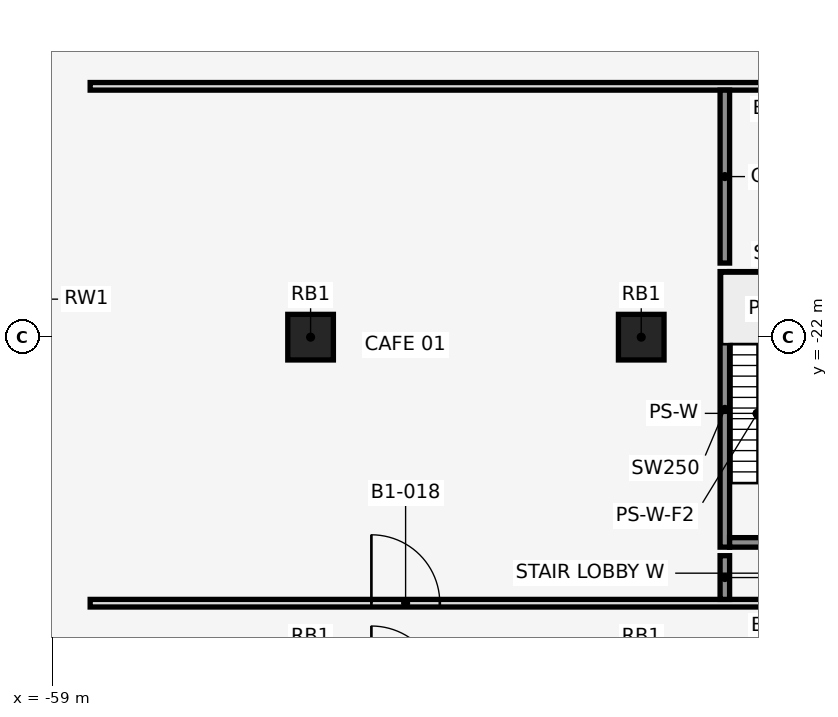
"""IFC4 building model, lengths in metres.
Left out: names, types, materials, properties, quantities, classifications, styles, units other than length and angle.
Written with IfcOpenShell. Run it as: python <this file> out.ifc"""

import sys

from ifc_helpers import new_model, si_unit, direction, frame, frame_2d, origin, origin_2d, place, context, subcontext, project, spatial, rectangle, extrude, element, fill, save


model = new_model("IFC4")
c1 = context("Model", 3, precision=1e-05, world=origin(), true_north=direction((0.0, 1.0)))
c2 = subcontext(c1, "Body", "Model", "MODEL_VIEW")
j1 = project(units=[si_unit("LENGTHUNIT", "METRE"), si_unit("PLANEANGLEUNIT", "RADIAN")], contexts=[c1])
p1 = place(None, origin())
s1 = spatial("IfcSite", under=j1, at=p1, CompositionType="ELEMENT")
p2 = place(p1, origin())
s2 = spatial("IfcBuilding", under=s1, at=p2, CompositionType="ELEMENT")
p3 = place(p2, frame((0.0, 0.0, -5.0)))
s3 = spatial("IfcBuildingStorey", under=s2, at=p3, CompositionType="ELEMENT", Elevation=-5.0)
for number, where, z_axis, x_axis in (
    (1, (-52.2, -22.0, 0.0), (0.0, 0.0, 1.0), (1.0, 0.0, 0.0)),
    (2, (-43.5, -22.0, 0.0), (0.0, 0.0, 1.0), (1.0, 0.0, 0.0)),
):
    element("IfcColumn", number, at=place(p3, frame(where, z_axis=z_axis, x_axis=x_axis)), inside=s3, PredefinedType="COLUMN", context=c2, shape_type="SweptSolid", body=[
        extrude(rectangle(XDim=1.2, YDim=1.2, at=origin_2d()), origin(), (0.0, 0.0, 1.0), 5.0),
    ])
p4 = place(p3, frame((-41.3, -27.525, 0.0), z_axis=(0.0, 0.0, 1.0), x_axis=(0.0, 1.0, 0.0)))
e3 = element("IfcWall", 3, at=p4, inside=s3, PredefinedType="SHEAR", context=c2, shape_type="SweptSolid", body=[
    extrude(rectangle(XDim=7.25, YDim=0.25, at=frame_2d((3.625, 0.0))), origin(), (0.0, 0.0, 1.0), 5.0),
])
p5 = place(p3, frame((-41.175, -27.4, 0.0), z_axis=(0.0, 0.0, 1.0), x_axis=(1.0, 0.0, 0.0)))
e4 = element("IfcWall", 4, at=p5, inside=s3, PredefinedType="SHEAR", context=c2, shape_type="SweptSolid", body=[
    extrude(rectangle(XDim=3.05, YDim=0.25, at=frame_2d((1.525, 0.0))), origin(), (0.0, 0.0, 1.0), 5.0),
])
p6 = place(p5, frame((1.1, 0.0, 0.0)))
e5 = element("IfcOpeningElement", 5, at=p6, cuts=e4, PredefinedType="OPENING", context=c2, shape_type="SweptSolid", body=[
    extrude(rectangle(XDim=0.9, YDim=2.1, at=frame_2d((0.45, 1.05))), frame((0.0, 0.137, 0.0), z_axis=(0.0, -1.0, 0.0), x_axis=(1.0, 0.0, 0.0)), (0.0, 0.0, 1.0), 0.274),
])
p7 = place(p3, frame((-41.175, -20.4, 0.0), z_axis=(0.0, 0.0, 1.0), x_axis=(1.0, 0.0, 0.0)))
e6 = element("IfcWall", 6, at=p7, inside=s3, PredefinedType="SHEAR", context=c2, shape_type="SweptSolid", body=[
    extrude(rectangle(XDim=3.05, YDim=0.25, at=frame_2d((1.525, 0.0))), origin(), (0.0, 0.0, 1.0), 5.0),
])
p8 = place(p3, frame((-58.0, -29.0, 0.0), z_axis=(0.0, 0.0, 1.0), x_axis=(1.0, 0.0, 0.0)))
e7 = element("IfcWall", 7, at=p8, inside=s3, PredefinedType="PARTITIONING", context=c2, shape_type="SweptSolid", body=[
    extrude(rectangle(XDim=38.425, YDim=0.2, at=frame_2d((19.212, 0.0))), origin(), (0.0, 0.0, 1.0), 4.7),
])
p9 = place(p8, frame((17.7, 0.0, 0.0)))
e8 = element("IfcOpeningElement", 8, at=p9, cuts=e7, PredefinedType="OPENING", context=c2, shape_type="SweptSolid", body=[
    extrude(rectangle(XDim=1.2, YDim=2.1, at=frame_2d((0.6, 1.05))), frame((0.0, 0.112, 0.0), z_axis=(0.0, -1.0, 0.0), x_axis=(1.0, 0.0, 0.0)), (0.0, 0.0, 1.0), 0.224),
])
p10 = place(p8, frame((36.0, 0.0, 0.0)))
e9 = element("IfcOpeningElement", 9, at=p10, cuts=e7, PredefinedType="OPENING", context=c2, shape_type="SweptSolid", body=[
    extrude(rectangle(XDim=1.2, YDim=2.1, at=frame_2d((0.6, 1.05))), frame((0.0, 0.112, 0.0), z_axis=(0.0, -1.0, 0.0), x_axis=(1.0, 0.0, 0.0)), (0.0, 0.0, 1.0), 0.224),
])
p11 = place(p8, frame((7.4, 0.0, 0.0)))
e10 = element("IfcOpeningElement", 10, at=p11, cuts=e7, PredefinedType="OPENING", context=c2, shape_type="SweptSolid", body=[
    extrude(rectangle(XDim=1.8, YDim=2.1, at=frame_2d((0.9, 1.05))), frame((0.0, 0.112, 0.0), z_axis=(0.0, -1.0, 0.0), x_axis=(1.0, 0.0, 0.0)), (0.0, 0.0, 1.0), 0.224),
])
p12 = place(p8, frame((27.0, 0.0, 0.0)))
e11 = element("IfcOpeningElement", 11, at=p12, cuts=e7, PredefinedType="OPENING", context=c2, shape_type="SweptSolid", body=[
    extrude(rectangle(XDim=1.0, YDim=2.1, at=frame_2d((0.5, 1.05))), frame((0.0, 0.112, 0.0), z_axis=(0.0, -1.0, 0.0), x_axis=(1.0, 0.0, 0.0)), (0.0, 0.0, 1.0), 0.224),
])
p13 = place(p3, frame((-58.0, -15.4, 0.0), z_axis=(0.0, 0.0, 1.0), x_axis=(1.0, 0.0, 0.0)))
e12 = element("IfcWall", 12, at=p13, inside=s3, PredefinedType="PARTITIONING", context=c2, shape_type="SweptSolid", body=[
    extrude(rectangle(XDim=38.425, YDim=0.2, at=frame_2d((19.212, 0.0))), origin(), (0.0, 0.0, 1.0), 4.7),
])
p14 = place(p13, frame((17.9, 0.0, 0.0)))
e13 = element("IfcOpeningElement", 13, at=p14, cuts=e12, PredefinedType="OPENING", context=c2, shape_type="SweptSolid", body=[
    extrude(rectangle(XDim=0.9, YDim=2.1, at=frame_2d((0.45, 1.05))), frame((0.0, 0.112, 0.0), z_axis=(0.0, -1.0, 0.0), x_axis=(1.0, 0.0, 0.0)), (0.0, 0.0, 1.0), 0.224),
])
p15 = place(p3, frame((-41.3, -28.9, 0.0), z_axis=(0.0, 0.0, 1.0), x_axis=(0.0, 1.0, 0.0)))
e14 = element("IfcWall", 14, at=p15, inside=s3, PredefinedType="SHEAR", context=c2, shape_type="SweptSolid", body=[
    extrude(rectangle(XDim=1.15, YDim=0.25, at=frame_2d((0.575, 0.0))), origin(), (0.0, 0.0, 1.0), 5.0),
])
p16 = place(p3, frame((-41.3, -20.05, 0.0), z_axis=(0.0, 0.0, 1.0), x_axis=(0.0, 1.0, 0.0)))
e15 = element("IfcWall", 15, at=p16, inside=s3, PredefinedType="SHEAR", context=c2, shape_type="SweptSolid", body=[
    extrude(rectangle(XDim=4.55, YDim=0.25, at=frame_2d((2.275, 0.0))), origin(), (0.0, 0.0, 1.0), 5.0),
])
p17 = place(p11, origin())
e16 = element("IfcDoor", 16, at=p17, inside=s3, OperationType="SINGLE_SWING_LEFT", PredefinedType="DOOR", context=c2, shape_type="SweptSolid", body=[
    extrude(rectangle(XDim=1.8, YDim=2.1, at=frame_2d((0.9, 1.05))), frame((0.0, 0.025, 0.0), z_axis=(0.0, -1.0, 0.0), x_axis=(1.0, 0.0, 0.0)), (0.0, 0.0, 1.0), 0.05),
])
fill(e10, e16)
save(model, sys.argv[1])
